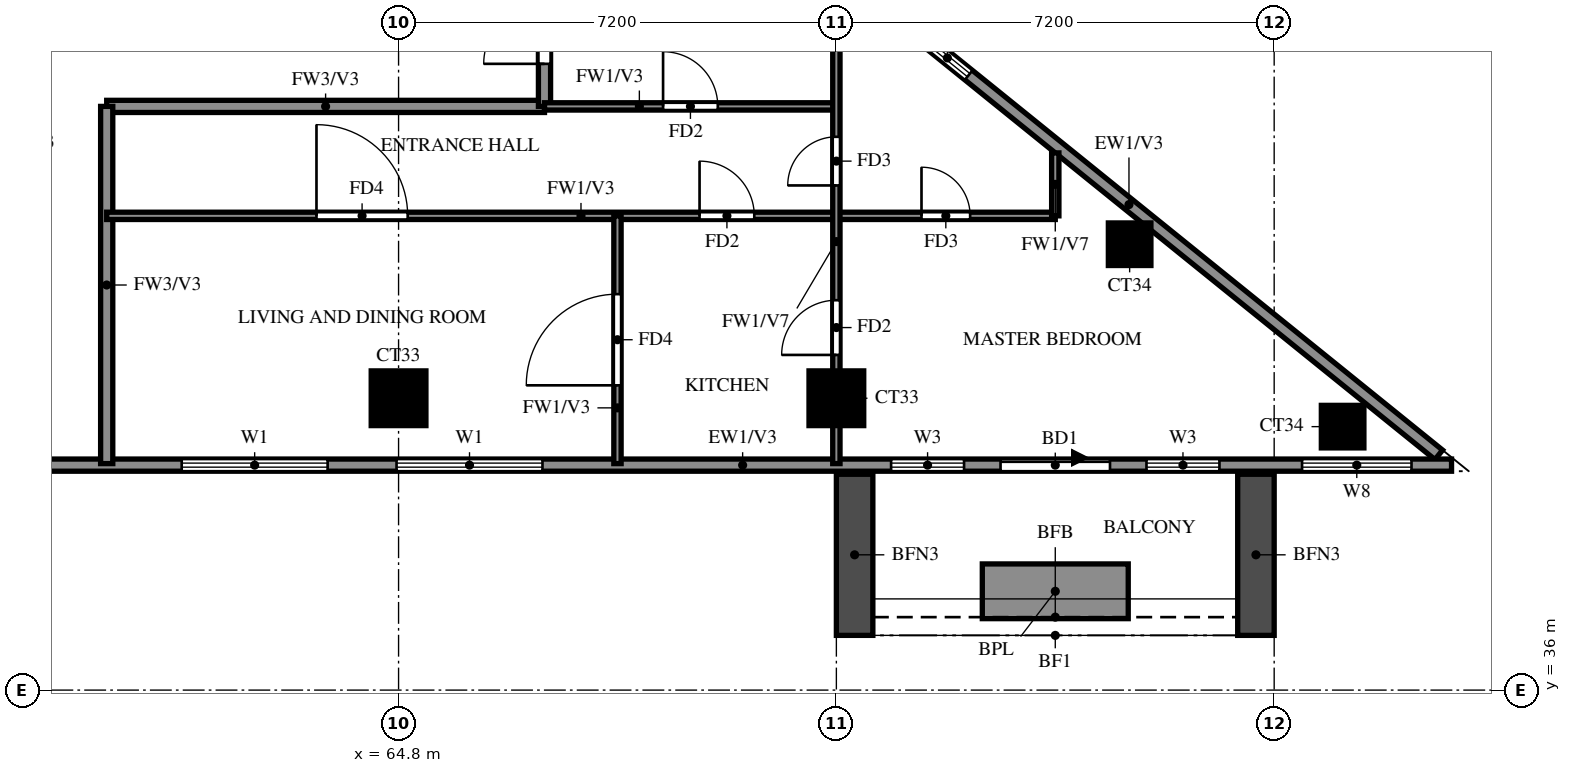
"""IFC4 building model, lengths in metres.
Left out: names, types, materials, properties, quantities, classifications, styles, units other than length and angle.
Written with IfcOpenShell. Run it as: python <this file> out.ifc"""

import sys

from ifc_helpers import new_model, si_unit, direction, frame, frame_2d, origin, origin_2d, place, context, subcontext, project, spatial, rectangle, extrude, source, transform, mapped, element, fill, save


model = new_model("IFC4")
c1 = context("Model", 3, precision=1e-05, world=origin(), true_north=direction((0.0, 1.0)))
c2 = subcontext(c1, "Body", "Model", "MODEL_VIEW")
j1 = project(units=[si_unit("LENGTHUNIT", "METRE"), si_unit("PLANEANGLEUNIT", "RADIAN")], contexts=[c1])
p1 = place(None, origin())
s1 = spatial("IfcSite", under=j1, at=p1, CompositionType="ELEMENT")
p2 = place(p1, origin())
s2 = spatial("IfcBuilding", under=s1, at=p2, CompositionType="ELEMENT")
p3 = place(p2, frame((0.0, 0.0, 222.0)))
s3 = spatial("IfcBuildingStorey", under=s2, at=p3, CompositionType="ELEMENT", Elevation=222.0)
m1 = source(origin(), c2, "Body", "SweptSolid", [
    extrude(rectangle(XDim=0.7, YDim=0.7, at=origin_2d()), origin(), (0.0, 0.0, 1.0), 3.22),
])
p4 = place(p3, frame((80.326, 40.333, 0.0), z_axis=(0.0, 0.0, 1.0), x_axis=(1.0, 0.0, 0.0)))
e1 = element("IfcColumn", 1, at=p4, inside=s3, PredefinedType="COLUMN", context=c2, shape_type="MappedRepresentation", body=[
    mapped(m1, transform((0.0, 0.0, 0.0))),
])
m2 = source(origin(), c2, "Body", "SweptSolid", [
    extrude(rectangle(XDim=0.9, YDim=0.9, at=origin_2d()), origin(), (0.0, 0.0, 1.0), 3.22),
])
for number, where, z_axis, x_axis in (
    (2, (64.8, 40.8, 0.0), (0.0, 0.0, 1.0), (1.0, 0.0, 0.0)),
    (3, (72.0, 40.8, 0.0), (0.0, 0.0, 1.0), (1.0, 0.0, 0.0)),
):
    element("IfcColumn", number, at=place(p3, frame(where, z_axis=z_axis, x_axis=x_axis)), inside=s3, PredefinedType="COLUMN", context=c2, shape_type="MappedRepresentation", body=[
        mapped(m2, transform((0.0, 0.0, 0.0))),
    ])
p5 = place(p3, frame((76.823, 43.333, 0.0), z_axis=(0.0, 0.0, 1.0), x_axis=(1.0, 0.0, 0.0)))
e4 = element("IfcColumn", 4, at=p5, inside=s3, PredefinedType="COLUMN", context=c2, shape_type="MappedRepresentation", body=[
    mapped(m1, transform((0.0, 0.0, 0.0))),
])
p6 = place(p3, frame((81.907, 39.87, 0.0), z_axis=(0.0, 0.0, 1.0), x_axis=(-0.777936274417, 0.62834318087, 0.0)))
e5 = element("IfcWall", 5, at=p6, inside=s3, PredefinedType="SOLIDWALL", context=c2, shape_type="SweptSolid", body=[
    extrude(rectangle(XDim=13.099, YDim=0.2, at=frame_2d((6.549, 0.0))), origin(), (0.0, 0.0, 1.0), 3.22),
])
p7 = place(p6, frame((9.938, 0.0, 1.5)))
e6 = element("IfcOpeningElement", 6, at=p7, cuts=e5, PredefinedType="OPENING", context=c2, shape_type="SweptSolid", body=[
    extrude(rectangle(XDim=0.9, YDim=0.9, at=frame_2d((0.45, 0.45))), frame((0.0, 0.11, 0.0), z_axis=(0.0, -1.0, 0.0), x_axis=(1.0, 0.0, 0.0)), (0.0, 0.0, 1.0), 0.22),
])
p8 = place(p3, frame((58.8, 39.7, 0.0), z_axis=(0.0, 0.0, 1.0), x_axis=(1.0, 0.0, 0.0)))
e7 = element("IfcWall", 7, at=p8, inside=s3, PredefinedType="SOLIDWALL", context=c2, shape_type="SweptSolid", body=[
    extrude(rectangle(XDim=23.317, YDim=0.2, at=frame_2d((11.658, 0.0))), origin(), (0.0, 0.0, 1.0), 3.22),
])
p9 = place(p8, frame((15.9, 0.0, 0.0)))
e8 = element("IfcOpeningElement", 8, at=p9, cuts=e7, PredefinedType="OPENING", context=c2, shape_type="SweptSolid", body=[
    extrude(rectangle(XDim=1.8, YDim=2.4, at=frame_2d((0.9, 1.2))), frame((0.0, 0.11, 0.0), z_axis=(0.0, -1.0, 0.0), x_axis=(1.0, 0.0, 0.0)), (0.0, 0.0, 1.0), 0.22),
])
p10 = place(p8, frame((2.433, 0.0, 0.6)))
e9 = element("IfcOpeningElement", 9, at=p10, cuts=e7, PredefinedType="OPENING", context=c2, shape_type="SweptSolid", body=[
    extrude(rectangle(XDim=2.4, YDim=2.4, at=frame_2d((1.2, 1.2))), frame((0.0, 0.11, 0.0), z_axis=(0.0, -1.0, 0.0), x_axis=(1.0, 0.0, 0.0)), (0.0, 0.0, 1.0), 0.22),
])
p11 = place(p8, frame((5.967, 0.0, 0.6)))
e10 = element("IfcOpeningElement", 10, at=p11, cuts=e7, PredefinedType="OPENING", context=c2, shape_type="SweptSolid", body=[
    extrude(rectangle(XDim=2.4, YDim=2.4, at=frame_2d((1.2, 1.2))), frame((0.0, 0.11, 0.0), z_axis=(0.0, -1.0, 0.0), x_axis=(1.0, 0.0, 0.0)), (0.0, 0.0, 1.0), 0.22),
])
p12 = place(p8, frame((14.1, 0.0, 0.6)))
e11 = element("IfcOpeningElement", 11, at=p12, cuts=e7, PredefinedType="OPENING", context=c2, shape_type="SweptSolid", body=[
    extrude(rectangle(XDim=1.2, YDim=2.4, at=frame_2d((0.6, 1.2))), frame((0.0, 0.11, 0.0), z_axis=(0.0, -1.0, 0.0), x_axis=(1.0, 0.0, 0.0)), (0.0, 0.0, 1.0), 0.22),
])
p13 = place(p8, frame((18.3, 0.0, 0.6)))
e12 = element("IfcOpeningElement", 12, at=p13, cuts=e7, PredefinedType="OPENING", context=c2, shape_type="SweptSolid", body=[
    extrude(rectangle(XDim=1.2, YDim=2.4, at=frame_2d((0.6, 1.2))), frame((0.0, 0.11, 0.0), z_axis=(0.0, -1.0, 0.0), x_axis=(1.0, 0.0, 0.0)), (0.0, 0.0, 1.0), 0.22),
])
p14 = place(p8, frame((20.858, 0.0, 0.6)))
e13 = element("IfcOpeningElement", 13, at=p14, cuts=e7, PredefinedType="OPENING", context=c2, shape_type="SweptSolid", body=[
    extrude(rectangle(XDim=1.8, YDim=2.4, at=frame_2d((0.9, 1.2))), frame((0.0, 0.11, 0.0), z_axis=(0.0, -1.0, 0.0), x_axis=(1.0, 0.0, 0.0)), (0.0, 0.0, 1.0), 0.22),
])
for number, where, z_axis, x_axis in (
    (14, (72.3, 39.55, 0.0), (0.0, 0.0, 1.0), (0.0, -1.0, 0.0)),
    (15, (78.9, 39.55, 0.0), (0.0, 0.0, 1.0), (0.0, -1.0, 0.0)),
):
    element("IfcWall", number, at=place(p3, frame(where, z_axis=z_axis, x_axis=x_axis)), inside=s3, PredefinedType="SOLIDWALL", context=c2, shape_type="SweptSolid", body=[
        extrude(rectangle(XDim=2.65, YDim=0.6, at=frame_2d((1.325, 0.0))), origin(), (0.0, 0.0, 1.0), 2.85),
    ])
p15 = place(p3, frame((74.4, 37.625, 0.0), z_axis=(0.0, 0.0, 1.0), x_axis=(1.0, 0.0, 0.0)))
e16 = element("IfcWall", 16, at=p15, inside=s3, PredefinedType="SOLIDWALL", context=c2, shape_type="SweptSolid", body=[
    extrude(rectangle(XDim=2.4, YDim=0.9, at=frame_2d((1.2, 0.0))), origin(), (0.0, 0.0, 1.0), 0.9),
])
p16 = place(p3, frame((60.0, 45.6, 0.0), z_axis=(0.0, 0.0, 1.0), x_axis=(1.0, 0.0, 0.0)))
e17 = element("IfcWall", 17, at=p16, inside=s3, PredefinedType="SOLIDWALL", context=c2, shape_type="SweptSolid", body=[
    extrude(rectangle(XDim=7.2, YDim=0.2, at=frame_2d((3.6, 0.0))), origin(), (0.0, 0.0, 1.0), 3.22),
])
p17 = place(p3, frame((60.0, 39.725, 0.0), z_axis=(0.0, 0.0, 1.0), x_axis=(0.0, 1.0, 0.0)))
e18 = element("IfcWall", 18, at=p17, inside=s3, PredefinedType="SOLIDWALL", context=c2, shape_type="SweptSolid", body=[
    extrude(rectangle(XDim=5.875, YDim=0.2, at=frame_2d((2.938, 0.0))), origin(), (0.0, 0.0, 1.0), 3.22),
])
p18 = place(p3, frame((67.2, 45.6, 0.0), z_axis=(0.0, 0.0, 1.0), x_axis=(0.0, 1.0, 0.0)))
e19 = element("IfcWall", 19, at=p18, inside=s3, PredefinedType="SOLIDWALL", context=c2, shape_type="SweptSolid", body=[
    extrude(rectangle(XDim=10.8, YDim=0.2, at=frame_2d((5.4, 0.0))), origin(), (0.0, 0.0, 1.0), 3.22),
])
p19 = place(p18, frame((9.1, 0.0, 0.0)))
e20 = element("IfcOpeningElement", 20, at=p19, cuts=e19, PredefinedType="OPENING", context=c2, shape_type="SweptSolid", body=[
    extrude(rectangle(XDim=1.0, YDim=2.1, at=frame_2d((0.5, 1.05))), frame((0.0, 0.11, 0.0), z_axis=(0.0, -1.0, 0.0), x_axis=(1.0, 0.0, 0.0)), (0.0, 0.0, 1.0), 0.22),
])
p20 = place(p18, frame((0.7, 0.0, 0.0)))
e21 = element("IfcOpeningElement", 21, at=p20, cuts=e19, PredefinedType="OPENING", context=c2, shape_type="SweptSolid", body=[
    extrude(rectangle(XDim=1.0, YDim=2.1, at=frame_2d((0.5, 1.05))), frame((0.0, 0.11, 0.0), z_axis=(0.0, -1.0, 0.0), x_axis=(1.0, 0.0, 0.0)), (0.0, 0.0, 1.0), 0.22),
])
p21 = place(p3, frame((60.0, 43.8, 0.0), z_axis=(0.0, 0.0, 1.0), x_axis=(1.0, 0.0, 0.0)))
e22 = element("IfcWall", 22, at=p21, inside=s3, PredefinedType="PARTITIONING", context=c2, shape_type="SweptSolid", body=[
    extrude(rectangle(XDim=15.6, YDim=0.12, at=frame_2d((7.8, 0.0))), origin(), (0.0, 0.0, 1.0), 3.22),
])
p22 = place(p21, frame((9.75, 0.0, 0.0)))
e23 = element("IfcOpeningElement", 23, at=p22, cuts=e22, PredefinedType="OPENING", context=c2, shape_type="SweptSolid", body=[
    extrude(rectangle(XDim=0.9, YDim=2.1, at=frame_2d((0.45, 1.05))), frame((0.0, 0.07, 0.0), z_axis=(0.0, -1.0, 0.0), x_axis=(1.0, 0.0, 0.0)), (0.0, 0.0, 1.0), 0.14),
])
p23 = place(p21, frame((3.45, 0.0, 0.0)))
e24 = element("IfcOpeningElement", 24, at=p23, cuts=e22, PredefinedType="OPENING", context=c2, shape_type="SweptSolid", body=[
    extrude(rectangle(XDim=1.5, YDim=2.1, at=frame_2d((0.75, 1.05))), frame((0.0, 0.07, 0.0), z_axis=(0.0, -1.0, 0.0), x_axis=(1.0, 0.0, 0.0)), (0.0, 0.0, 1.0), 0.14),
])
p24 = place(p21, frame((13.4, 0.0, 0.0)))
e25 = element("IfcOpeningElement", 25, at=p24, cuts=e22, PredefinedType="OPENING", context=c2, shape_type="SweptSolid", body=[
    extrude(rectangle(XDim=0.8, YDim=2.1, at=frame_2d((0.4, 1.05))), frame((0.0, 0.07, 0.0), z_axis=(0.0, -1.0, 0.0), x_axis=(1.0, 0.0, 0.0)), (0.0, 0.0, 1.0), 0.14),
])
p25 = place(p3, frame((67.2, 45.6, 0.0), z_axis=(0.0, 0.0, 1.0), x_axis=(1.0, 0.0, 0.0)))
e26 = element("IfcWall", 26, at=p25, inside=s3, PredefinedType="PARTITIONING", context=c2, shape_type="SweptSolid", body=[
    extrude(rectangle(XDim=4.8, YDim=0.12, at=frame_2d((2.4, 0.0))), origin(), (0.0, 0.0, 1.0), 3.22),
])
p26 = place(p25, frame((1.95, 0.0, 0.0)))
e27 = element("IfcOpeningElement", 27, at=p26, cuts=e26, PredefinedType="OPENING", context=c2, shape_type="SweptSolid", body=[
    extrude(rectangle(XDim=0.9, YDim=2.1, at=frame_2d((0.45, 1.05))), frame((0.0, 0.07, 0.0), z_axis=(0.0, -1.0, 0.0), x_axis=(1.0, 0.0, 0.0)), (0.0, 0.0, 1.0), 0.14),
])
p27 = place(p3, frame((68.4, 39.725, 0.0), z_axis=(0.0, 0.0, 1.0), x_axis=(0.0, 1.0, 0.0)))
e28 = element("IfcWall", 28, at=p27, inside=s3, PredefinedType="PARTITIONING", context=c2, shape_type="SweptSolid", body=[
    extrude(rectangle(XDim=4.075, YDim=0.12, at=frame_2d((2.038, 0.0))), origin(), (0.0, 0.0, 1.0), 3.22),
])
p28 = place(p27, frame((1.288, 0.0, 0.0)))
e29 = element("IfcOpeningElement", 29, at=p28, cuts=e28, PredefinedType="OPENING", context=c2, shape_type="SweptSolid", body=[
    extrude(rectangle(XDim=1.5, YDim=2.1, at=frame_2d((0.75, 1.05))), frame((0.0, 0.07, 0.0), z_axis=(0.0, -1.0, 0.0), x_axis=(1.0, 0.0, 0.0)), (0.0, 0.0, 1.0), 0.14),
])
p29 = place(p3, frame((72.0, 39.725, 0.0), z_axis=(0.0, 0.0, 1.0), x_axis=(0.0, 1.0, 0.0)))
e30 = element("IfcWall", 30, at=p29, inside=s3, PredefinedType="PARTITIONING", context=c2, shape_type="SweptSolid", body=[
    extrude(rectangle(XDim=8.114, YDim=0.12, at=frame_2d((4.057, 0.0))), origin(), (0.0, 0.0, 1.0), 2.32),
])
p30 = place(p29, frame((1.788, 0.0, 0.0)))
e31 = element("IfcOpeningElement", 31, at=p30, cuts=e30, PredefinedType="OPENING", context=c2, shape_type="SweptSolid", body=[
    extrude(rectangle(XDim=0.9, YDim=2.1, at=frame_2d((0.45, 1.05))), frame((0.0, 0.07, 0.0), z_axis=(0.0, -1.0, 0.0), x_axis=(1.0, 0.0, 0.0)), (0.0, 0.0, 1.0), 0.14),
])
p31 = place(p29, frame((4.575, 0.0, 0.0)))
e32 = element("IfcOpeningElement", 32, at=p31, cuts=e30, PredefinedType="OPENING", context=c2, shape_type="SweptSolid", body=[
    extrude(rectangle(XDim=0.8, YDim=2.1, at=frame_2d((0.4, 1.05))), frame((0.0, 0.07, 0.0), z_axis=(0.0, -1.0, 0.0), x_axis=(1.0, 0.0, 0.0)), (0.0, 0.0, 1.0), 0.14),
])
p32 = place(p3, frame((75.6, 43.8, 0.0), z_axis=(0.0, 0.0, 1.0), x_axis=(0.0, 1.0, 0.0)))
e33 = element("IfcWall", 33, at=p32, inside=s3, PredefinedType="PARTITIONING", context=c2, shape_type="SweptSolid", body=[
    extrude(rectangle(XDim=1.035, YDim=0.12, at=frame_2d((0.518, 0.0))), origin(), (0.0, 0.0, 1.0), 2.32),
])
p33 = place(p7, origin())
e34 = element("IfcWindow", 34, at=p33, inside=s3, PartitioningType="SINGLE_PANEL", PredefinedType="WINDOW", context=c2, shape_type="SweptSolid", body=[
    extrude(rectangle(XDim=0.9, YDim=0.9, at=frame_2d((0.45, 0.45))), frame((0.0, 0.03, 0.0), z_axis=(0.0, -1.0, 0.0), x_axis=(1.0, 0.0, 0.0)), (0.0, 0.0, 1.0), 0.06),
])
fill(e6, e34)
p34 = place(p9, origin())
e35 = element("IfcDoor", 35, at=p34, inside=s3, OperationType="DOUBLE_DOOR_SLIDING", PredefinedType="DOOR", context=c2, shape_type="SweptSolid", body=[
    extrude(rectangle(XDim=1.8, YDim=2.4, at=frame_2d((0.9, 1.2))), frame((0.0, 0.025, 0.0), z_axis=(0.0, -1.0, 0.0), x_axis=(1.0, 0.0, 0.0)), (0.0, 0.0, 1.0), 0.05),
])
fill(e8, e35)
p35 = place(p10, origin())
e36 = element("IfcWindow", 36, at=p35, inside=s3, PartitioningType="DOUBLE_PANEL_VERTICAL", PredefinedType="WINDOW", context=c2, shape_type="SweptSolid", body=[
    extrude(rectangle(XDim=2.4, YDim=2.4, at=frame_2d((1.2, 1.2))), frame((0.0, 0.03, 0.0), z_axis=(0.0, -1.0, 0.0), x_axis=(1.0, 0.0, 0.0)), (0.0, 0.0, 1.0), 0.06),
])
fill(e9, e36)
p36 = place(p11, origin())
e37 = element("IfcWindow", 37, at=p36, inside=s3, PartitioningType="DOUBLE_PANEL_VERTICAL", PredefinedType="WINDOW", context=c2, shape_type="SweptSolid", body=[
    extrude(rectangle(XDim=2.4, YDim=2.4, at=frame_2d((1.2, 1.2))), frame((0.0, 0.03, 0.0), z_axis=(0.0, -1.0, 0.0), x_axis=(1.0, 0.0, 0.0)), (0.0, 0.0, 1.0), 0.06),
])
fill(e10, e37)
p37 = place(p12, origin())
e38 = element("IfcWindow", 38, at=p37, inside=s3, PartitioningType="SINGLE_PANEL", PredefinedType="WINDOW", context=c2, shape_type="SweptSolid", body=[
    extrude(rectangle(XDim=1.2, YDim=2.4, at=frame_2d((0.6, 1.2))), frame((0.0, 0.03, 0.0), z_axis=(0.0, -1.0, 0.0), x_axis=(1.0, 0.0, 0.0)), (0.0, 0.0, 1.0), 0.06),
])
fill(e11, e38)
p38 = place(p13, origin())
e39 = element("IfcWindow", 39, at=p38, inside=s3, PartitioningType="SINGLE_PANEL", PredefinedType="WINDOW", context=c2, shape_type="SweptSolid", body=[
    extrude(rectangle(XDim=1.2, YDim=2.4, at=frame_2d((0.6, 1.2))), frame((0.0, 0.03, 0.0), z_axis=(0.0, -1.0, 0.0), x_axis=(1.0, 0.0, 0.0)), (0.0, 0.0, 1.0), 0.06),
])
fill(e12, e39)
p39 = place(p14, origin())
e40 = element("IfcWindow", 40, at=p39, inside=s3, PartitioningType="DOUBLE_PANEL_VERTICAL", PredefinedType="WINDOW", context=c2, shape_type="SweptSolid", body=[
    extrude(rectangle(XDim=1.8, YDim=2.4, at=frame_2d((0.9, 1.2))), frame((0.0, 0.03, 0.0), z_axis=(0.0, -1.0, 0.0), x_axis=(1.0, 0.0, 0.0)), (0.0, 0.0, 1.0), 0.06),
])
fill(e13, e40)
p40 = place(p28, origin())
e41 = element("IfcDoor", 41, at=p40, inside=s3, OperationType="SINGLE_SWING_LEFT", PredefinedType="DOOR", context=c2, shape_type="SweptSolid", body=[
    extrude(rectangle(XDim=1.5, YDim=2.1, at=frame_2d((0.75, 1.05))), frame((0.0, 0.025, 0.0), z_axis=(0.0, -1.0, 0.0), x_axis=(1.0, 0.0, 0.0)), (0.0, 0.0, 1.0), 0.05),
])
fill(e29, e41)
p41 = place(p26, origin())
e42 = element("IfcDoor", 42, at=p41, inside=s3, OperationType="SINGLE_SWING_RIGHT", PredefinedType="DOOR", context=c2, shape_type="SweptSolid", body=[
    extrude(rectangle(XDim=0.9, YDim=2.1, at=frame_2d((0.45, 1.05))), frame((0.0, 0.025, 0.0), z_axis=(0.0, -1.0, 0.0), x_axis=(1.0, 0.0, 0.0)), (0.0, 0.0, 1.0), 0.05),
])
fill(e27, e42)
p42 = place(p20, origin())
e43 = element("IfcDoor", 43, at=p42, inside=s3, OperationType="SINGLE_SWING_LEFT", PredefinedType="DOOR", context=c2, shape_type="SweptSolid", body=[
    extrude(rectangle(XDim=1.0, YDim=2.1, at=frame_2d((0.5, 1.05))), frame((0.0, 0.025, 0.0), z_axis=(0.0, -1.0, 0.0), x_axis=(1.0, 0.0, 0.0)), (0.0, 0.0, 1.0), 0.05),
])
fill(e21, e43)
p43 = place(p22, origin())
e44 = element("IfcDoor", 44, at=p43, inside=s3, OperationType="SINGLE_SWING_LEFT", PredefinedType="DOOR", context=c2, shape_type="SweptSolid", body=[
    extrude(rectangle(XDim=0.9, YDim=2.1, at=frame_2d((0.45, 1.05))), frame((0.0, 0.025, 0.0), z_axis=(0.0, -1.0, 0.0), x_axis=(1.0, 0.0, 0.0)), (0.0, 0.0, 1.0), 0.05),
])
fill(e23, e44)
p44 = place(p23, origin())
e45 = element("IfcDoor", 45, at=p44, inside=s3, OperationType="SINGLE_SWING_RIGHT", PredefinedType="DOOR", context=c2, shape_type="SweptSolid", body=[
    extrude(rectangle(XDim=1.5, YDim=2.1, at=frame_2d((0.75, 1.05))), frame((0.0, 0.025, 0.0), z_axis=(0.0, -1.0, 0.0), x_axis=(1.0, 0.0, 0.0)), (0.0, 0.0, 1.0), 0.05),
])
fill(e24, e45)
p45 = place(p30, origin())
e46 = element("IfcDoor", 46, at=p45, inside=s3, OperationType="SINGLE_SWING_RIGHT", PredefinedType="DOOR", context=c2, shape_type="SweptSolid", body=[
    extrude(rectangle(XDim=0.9, YDim=2.1, at=frame_2d((0.45, 1.05))), frame((0.0, 0.025, 0.0), z_axis=(0.0, -1.0, 0.0), x_axis=(1.0, 0.0, 0.0)), (0.0, 0.0, 1.0), 0.05),
])
fill(e31, e46)
p46 = place(p31, origin())
e47 = element("IfcDoor", 47, at=p46, inside=s3, OperationType="SINGLE_SWING_LEFT", PredefinedType="DOOR", context=c2, shape_type="SweptSolid", body=[
    extrude(rectangle(XDim=0.8, YDim=2.1, at=frame_2d((0.4, 1.05))), frame((0.0, 0.025, 0.0), z_axis=(0.0, -1.0, 0.0), x_axis=(1.0, 0.0, 0.0)), (0.0, 0.0, 1.0), 0.05),
])
fill(e32, e47)
p47 = place(p24, origin())
e48 = element("IfcDoor", 48, at=p47, inside=s3, OperationType="SINGLE_SWING_RIGHT", PredefinedType="DOOR", context=c2, shape_type="SweptSolid", body=[
    extrude(rectangle(XDim=0.8, YDim=2.1, at=frame_2d((0.4, 1.05))), frame((0.0, 0.025, 0.0), z_axis=(0.0, -1.0, 0.0), x_axis=(1.0, 0.0, 0.0)), (0.0, 0.0, 1.0), 0.05),
])
fill(e25, e48)
save(model, sys.argv[1])
